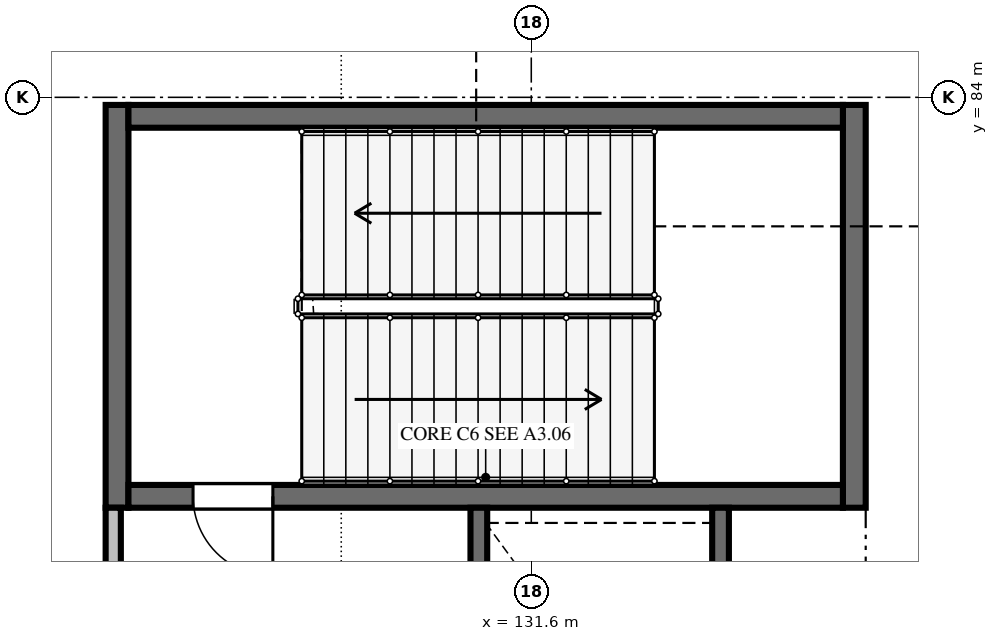
"""IFC4 building model, lengths in metres.
Left out: names, types, materials, properties, quantities, classifications, styles, units other than length and angle.
Written with IfcOpenShell. Run it as: python <this file> out.ifc"""

import sys

from ifc_helpers import new_model, si_unit, direction, frame, frame_2d, origin, place, context, subcontext, project, spatial, rectangle, extrude, element, fill, save


model = new_model("IFC4")
c1 = context("Model", 3, precision=1e-05, world=origin(), true_north=direction((0.0, 1.0)))
c2 = subcontext(c1, "Body", "Model", "MODEL_VIEW")
j1 = project(units=[si_unit("LENGTHUNIT", "METRE"), si_unit("PLANEANGLEUNIT", "RADIAN")], contexts=[c1])
p1 = place(None, origin())
s1 = spatial("IfcSite", under=j1, at=p1, CompositionType="ELEMENT")
p2 = place(p1, origin())
s2 = spatial("IfcBuilding", under=s1, at=p2, CompositionType="ELEMENT")
p3 = place(p2, frame((0.0, 0.0, 10.8)))
s3 = spatial("IfcBuildingStorey", under=s2, at=p3, CompositionType="ELEMENT", Elevation=10.8)
for number, where, z_axis, x_axis in (
    (1, (126.15, 78.6, 0.0), (0.0, 0.0, 1.0), (0.0, 1.0, 0.0)),
    (2, (135.85, 83.9, 0.0), (0.0, 0.0, 1.0), (0.0, -1.0, 0.0)),
):
    element("IfcWall", number, at=place(p3, frame(where, z_axis=z_axis, x_axis=x_axis)), inside=s3, PredefinedType="SHEAR", context=c2, shape_type="SweptSolid", body=[
        extrude(rectangle(XDim=5.3, YDim=0.3, at=frame_2d((2.65, 0.0))), origin(), (0.0, 0.0, 1.0), 5.775),
    ])
p4 = place(p3, frame((135.7, 78.75, 0.0), z_axis=(0.0, 0.0, 1.0), x_axis=(-1.0, 0.0, 0.0)))
e3 = element("IfcWall", 3, at=p4, inside=s3, PredefinedType="SHEAR", context=c2, shape_type="SweptSolid", body=[
    extrude(rectangle(XDim=9.4, YDim=0.3, at=frame_2d((4.7, 0.0))), origin(), (0.0, 0.0, 1.0), 5.775),
])
p5 = place(p4, frame((7.5, 0.0, 0.0)))
e4 = element("IfcOpeningElement", 4, at=p5, cuts=e3, PredefinedType="OPENING", context=c2, shape_type="SweptSolid", body=[
    extrude(rectangle(XDim=1.05, YDim=2.2, at=frame_2d((0.525, 1.1))), frame((0.0, 0.16, 0.0), z_axis=(0.0, -1.0, 0.0), x_axis=(1.0, 0.0, 0.0)), (0.0, 0.0, 1.0), 0.32),
])
p6 = place(p3, frame((126.3, 83.75, 0.0), z_axis=(0.0, 0.0, 1.0), x_axis=(1.0, 0.0, 0.0)))
e5 = element("IfcWall", 5, at=p6, inside=s3, PredefinedType="SHEAR", context=c2, shape_type="SweptSolid", body=[
    extrude(rectangle(XDim=9.4, YDim=0.3, at=frame_2d((4.7, 0.0))), origin(), (0.0, 0.0, 1.0), 5.775),
])
p7 = place(p3, frame((126.1, 74.1, 0.0), z_axis=(0.0, 0.0, 1.0), x_axis=(0.0, 1.0, 0.0)))
e6 = element("IfcWall", 6, at=p7, inside=s3, PredefinedType="SOLIDWALL", context=c2, shape_type="SweptSolid", body=[
    extrude(rectangle(XDim=4.5, YDim=0.2, at=frame_2d((2.25, 0.0))), origin(), (0.0, 0.0, 1.0), 5.65),
])
p8 = place(p3, frame((130.91, 74.1, 0.0), z_axis=(0.0, 0.0, 1.0), x_axis=(0.0, 1.0, 0.0)))
e7 = element("IfcWall", 7, at=p8, inside=s3, PredefinedType="SOLIDWALL", context=c2, shape_type="SweptSolid", body=[
    extrude(rectangle(XDim=4.5, YDim=0.22, at=frame_2d((2.25, 0.0))), origin(), (0.0, 0.0, 1.0), 5.775),
])
p9 = place(p8, frame((1.65, 0.0, 0.0)))
e8 = element("IfcOpeningElement", 8, at=p9, cuts=e7, PredefinedType="OPENING", context=c2, shape_type="SweptSolid", body=[
    extrude(rectangle(XDim=1.2, YDim=2.2, at=frame_2d((0.6, 1.1))), frame((0.0, 0.12, 0.0), z_axis=(0.0, -1.0, 0.0), x_axis=(1.0, 0.0, 0.0)), (0.0, 0.0, 1.0), 0.24),
])
p10 = place(p3, frame((134.09, 74.1, 0.0), z_axis=(0.0, 0.0, 1.0), x_axis=(0.0, 1.0, 0.0)))
e9 = element("IfcWall", 9, at=p10, inside=s3, PredefinedType="SOLIDWALL", context=c2, shape_type="SweptSolid", body=[
    extrude(rectangle(XDim=4.5, YDim=0.22, at=frame_2d((2.25, 0.0))), origin(), (0.0, 0.0, 1.0), 5.775),
])
p11 = place(p5, origin())
e10 = element("IfcDoor", 10, at=p11, inside=s3, OperationType="SINGLE_SWING_LEFT", PredefinedType="DOOR", context=c2, shape_type="SweptSolid", body=[
    extrude(rectangle(XDim=1.05, YDim=2.2, at=frame_2d((0.525, 1.1))), frame((0.0, 0.025, 0.0), z_axis=(0.0, -1.0, 0.0), x_axis=(1.0, 0.0, 0.0)), (0.0, 0.0, 1.0), 0.05),
])
fill(e4, e10)
save(model, sys.argv[1])
